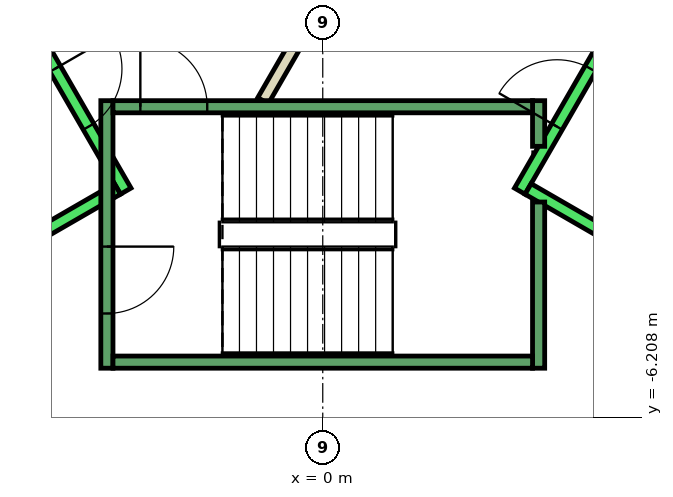
"""IFC4 building model, lengths in metres.
Left out: names, types, materials, properties, quantities, classifications, styles, units other than length and angle.
Written with IfcOpenShell. Run it as: python <this file> out.ifc"""

import sys

from ifc_helpers import new_model, si_unit, direction, frame, frame_2d, origin, place, context, subcontext, project, spatial, rectangle, extrude, element, fill, save


model = new_model("IFC4")
c1 = context("Model", 3, precision=1e-05, world=origin(), true_north=direction((0.0, 1.0)))
c2 = subcontext(c1, "Body", "Model", "MODEL_VIEW")
j1 = project(units=[si_unit("LENGTHUNIT", "METRE"), si_unit("PLANEANGLEUNIT", "RADIAN")], contexts=[c1])
p1 = place(None, origin())
s1 = spatial("IfcSite", under=j1, at=p1, CompositionType="ELEMENT")
p2 = place(p1, origin())
s2 = spatial("IfcBuilding", under=s1, at=p2, CompositionType="ELEMENT")
p3 = place(p2, frame((0.0, 0.0, 270.2)))
s3 = spatial("IfcBuildingStorey", under=s2, at=p3, CompositionType="ELEMENT", Elevation=270.2)
p4 = place(p3, frame((-0.982, -1.0, 0.0), z_axis=(0.0, 0.0, 1.0), x_axis=(0.50024047865, 0.865886518847, 0.0)))
e1 = element("IfcWall", 1, at=p4, inside=s3, PredefinedType="PARTITIONING", context=c2, shape_type="SweptSolid", body=[
    extrude(rectangle(XDim=1.863, YDim=0.2, at=frame_2d((0.931, 0.0))), origin(), (0.0, 0.0, 1.0), 3.26),
])
p5 = place(p3, frame((-5.94, 2.188, 0.0), z_axis=(0.0, 0.0, 1.0), x_axis=(0.500034260056, -0.866005622828, 0.0)))
e2 = element("IfcWall", 2, at=p5, inside=s3, PredefinedType="STANDARD", context=c2, shape_type="SweptSolid", body=[
    extrude(rectangle(XDim=5.399, YDim=0.2, at=frame_2d((2.7, 0.0))), origin(), (0.0, 0.0, 1.0), 3.26),
])
p6 = place(p5, frame((3.075, 0.0, 0.0)))
e3 = element("IfcOpeningElement", 3, at=p6, cuts=e2, PredefinedType="OPENING", context=c2, shape_type="SweptSolid", body=[
    extrude(rectangle(XDim=1.1, YDim=2.1, at=frame_2d((0.55, 1.05))), frame((0.0, 0.11, 0.0), z_axis=(0.0, -1.0, 0.0), x_axis=(1.0, 0.0, 0.0)), (0.0, 0.0, 1.0), 0.22),
])
p7 = place(p5, frame((1.225, 0.0, 0.0)))
e4 = element("IfcOpeningElement", 4, at=p7, cuts=e2, PredefinedType="OPENING", context=c2, shape_type="SweptSolid", body=[
    extrude(rectangle(XDim=1.1, YDim=2.1, at=frame_2d((0.55, 1.05))), frame((0.0, 0.11, 0.0), z_axis=(0.0, -1.0, 0.0), x_axis=(1.0, 0.0, 0.0)), (0.0, 0.0, 1.0), 0.22),
])
p8 = place(p3, frame((-3.377, -2.452, 0.0), z_axis=(0.0, 0.0, 1.0), x_axis=(-0.865955154139, -0.50012165622, 0.0)))
e5 = element("IfcWall", 5, at=p8, inside=s3, PredefinedType="STANDARD", context=c2, shape_type="SweptSolid", body=[
    extrude(rectangle(XDim=2.4, YDim=0.2, at=frame_2d((1.2, 0.0))), origin(), (0.0, 0.0, 1.0), 3.26),
])
p9 = place(p3, frame((3.24, -2.488, 0.0), z_axis=(0.0, 0.0, 1.0), x_axis=(0.500034260056, 0.866005622828, 0.0)))
e6 = element("IfcWall", 6, at=p9, inside=s3, PredefinedType="STANDARD", context=c2, shape_type="SweptSolid", body=[
    extrude(rectangle(XDim=5.399, YDim=0.2, at=frame_2d((2.7, 0.0))), origin(), (0.0, 0.0, 1.0), 3.26),
])
p10 = place(p9, frame((3.225, 0.0, 0.0)))
e7 = element("IfcOpeningElement", 7, at=p10, cuts=e6, PredefinedType="OPENING", context=c2, shape_type="SweptSolid", body=[
    extrude(rectangle(XDim=1.1, YDim=2.1, at=frame_2d((0.55, 1.05))), frame((0.0, 0.11, 0.0), z_axis=(0.0, -1.0, 0.0), x_axis=(1.0, 0.0, 0.0)), (0.0, 0.0, 1.0), 0.22),
])
p11 = place(p9, frame((1.225, 0.0, 0.0)))
e8 = element("IfcOpeningElement", 8, at=p11, cuts=e6, PredefinedType="OPENING", context=c2, shape_type="SweptSolid", body=[
    extrude(rectangle(XDim=1.1, YDim=2.1, at=frame_2d((0.55, 1.05))), frame((0.0, 0.11, 0.0), z_axis=(0.0, -1.0, 0.0), x_axis=(1.0, 0.0, 0.0)), (0.0, 0.0, 1.0), 0.22),
])
p12 = place(p3, frame((3.377, -2.452, 0.0), z_axis=(0.0, 0.0, 1.0), x_axis=(0.865955154139, -0.50012165622, 0.0)))
e9 = element("IfcWall", 9, at=p12, inside=s3, PredefinedType="STANDARD", context=c2, shape_type="SweptSolid", body=[
    extrude(rectangle(XDim=2.4, YDim=0.2, at=frame_2d((1.2, 0.0))), origin(), (0.0, 0.0, 1.0), 3.26),
])
p13 = place(p3, frame((-3.55, -1.0, 0.0), z_axis=(0.0, 0.0, 1.0), x_axis=(0.0, -1.0, 0.0)))
e10 = element("IfcWall", 10, at=p13, inside=s3, PredefinedType="STANDARD", context=c2, shape_type="SweptSolid", body=[
    extrude(rectangle(XDim=4.4, YDim=0.2, at=frame_2d((2.2, 0.0))), origin(), (0.0, 0.0, 1.0), 3.26),
])
p14 = place(p13, frame((2.4, 0.0, 0.0)))
e11 = element("IfcOpeningElement", 11, at=p14, cuts=e10, PredefinedType="OPENING", context=c2, shape_type="SweptSolid", body=[
    extrude(rectangle(XDim=1.1, YDim=2.2, at=frame_2d((0.55, 1.1))), frame((0.0, 0.11, 0.0), z_axis=(0.0, -1.0, 0.0), x_axis=(1.0, 0.0, 0.0)), (0.0, 0.0, 1.0), 0.22),
])
p15 = place(p3, frame((3.55, -2.667, 0.0), z_axis=(0.0, 0.0, 1.0), x_axis=(0.0, -1.0, 0.0)))
e12 = element("IfcWall", 12, at=p15, inside=s3, PredefinedType="STANDARD", context=c2, shape_type="SweptSolid", body=[
    extrude(rectangle(XDim=2.733, YDim=0.2, at=frame_2d((1.366, 0.0))), origin(), (0.0, 0.0, 1.0), 3.26),
])
p16 = place(p3, frame((3.55, -1.0, 0.0), z_axis=(0.0, 0.0, 1.0), x_axis=(0.0, -1.0, 0.0)))
e13 = element("IfcWall", 13, at=p16, inside=s3, PredefinedType="STANDARD", context=c2, shape_type="SweptSolid", body=[
    extrude(rectangle(XDim=0.751, YDim=0.2, at=frame_2d((0.375, 0.0))), origin(), (0.0, 0.0, 1.0), 3.26),
])
p17 = place(p3, frame((-3.45, -1.1, 0.0), z_axis=(0.0, 0.0, 1.0), x_axis=(1.0, 0.0, 0.0)))
e14 = element("IfcWall", 14, at=p17, inside=s3, PredefinedType="STANDARD", context=c2, shape_type="SweptSolid", body=[
    extrude(rectangle(XDim=6.9, YDim=0.2, at=frame_2d((3.45, 0.0))), origin(), (0.0, 0.0, 1.0), 3.26),
])
p18 = place(p17, frame((0.45, 0.0, 0.0)))
e15 = element("IfcOpeningElement", 15, at=p18, cuts=e14, PredefinedType="OPENING", context=c2, shape_type="SweptSolid", body=[
    extrude(rectangle(XDim=1.1, YDim=2.2, at=frame_2d((0.55, 1.1))), frame((0.0, 0.11, 0.0), z_axis=(0.0, -1.0, 0.0), x_axis=(1.0, 0.0, 0.0)), (0.0, 0.0, 1.0), 0.22),
])
p19 = place(p3, frame((-3.45, -5.3, 0.0), z_axis=(0.0, 0.0, 1.0), x_axis=(1.0, 0.0, 0.0)))
e16 = element("IfcWall", 16, at=p19, inside=s3, PredefinedType="STANDARD", context=c2, shape_type="SweptSolid", body=[
    extrude(rectangle(XDim=6.9, YDim=0.2, at=frame_2d((3.45, 0.0))), origin(), (0.0, 0.0, 1.0), 3.26),
])
p20 = place(p6, origin())
e17 = element("IfcDoor", 17, at=p20, inside=s3, OperationType="SLIDING_TO_LEFT", PredefinedType="DOOR", context=c2, shape_type="SweptSolid", body=[
    extrude(rectangle(XDim=1.1, YDim=2.1, at=frame_2d((0.55, 1.05))), frame((0.0, 0.025, 0.0), z_axis=(0.0, -1.0, 0.0), x_axis=(1.0, 0.0, 0.0)), (0.0, 0.0, 1.0), 0.05),
])
fill(e3, e17)
p21 = place(p11, origin())
e18 = element("IfcDoor", 18, at=p21, inside=s3, OperationType="SLIDING_TO_LEFT", PredefinedType="DOOR", context=c2, shape_type="SweptSolid", body=[
    extrude(rectangle(XDim=1.1, YDim=2.1, at=frame_2d((0.55, 1.05))), frame((0.0, 0.025, 0.0), z_axis=(0.0, -1.0, 0.0), x_axis=(1.0, 0.0, 0.0)), (0.0, 0.0, 1.0), 0.05),
])
fill(e8, e18)
p22 = place(p18, origin())
e19 = element("IfcDoor", 19, at=p22, inside=s3, OperationType="SINGLE_SWING_LEFT", PredefinedType="DOOR", context=c2, shape_type="SweptSolid", body=[
    extrude(rectangle(XDim=1.1, YDim=2.2, at=frame_2d((0.55, 1.1))), frame((0.0, 0.025, 0.0), z_axis=(0.0, -1.0, 0.0), x_axis=(1.0, 0.0, 0.0)), (0.0, 0.0, 1.0), 0.05),
])
fill(e15, e19)
p23 = place(p14, origin())
e20 = element("IfcDoor", 20, at=p23, inside=s3, OperationType="SINGLE_SWING_LEFT", PredefinedType="DOOR", context=c2, shape_type="SweptSolid", body=[
    extrude(rectangle(XDim=1.1, YDim=2.2, at=frame_2d((0.55, 1.1))), frame((0.0, 0.025, 0.0), z_axis=(0.0, -1.0, 0.0), x_axis=(1.0, 0.0, 0.0)), (0.0, 0.0, 1.0), 0.05),
])
fill(e11, e20)
save(model, sys.argv[1])
